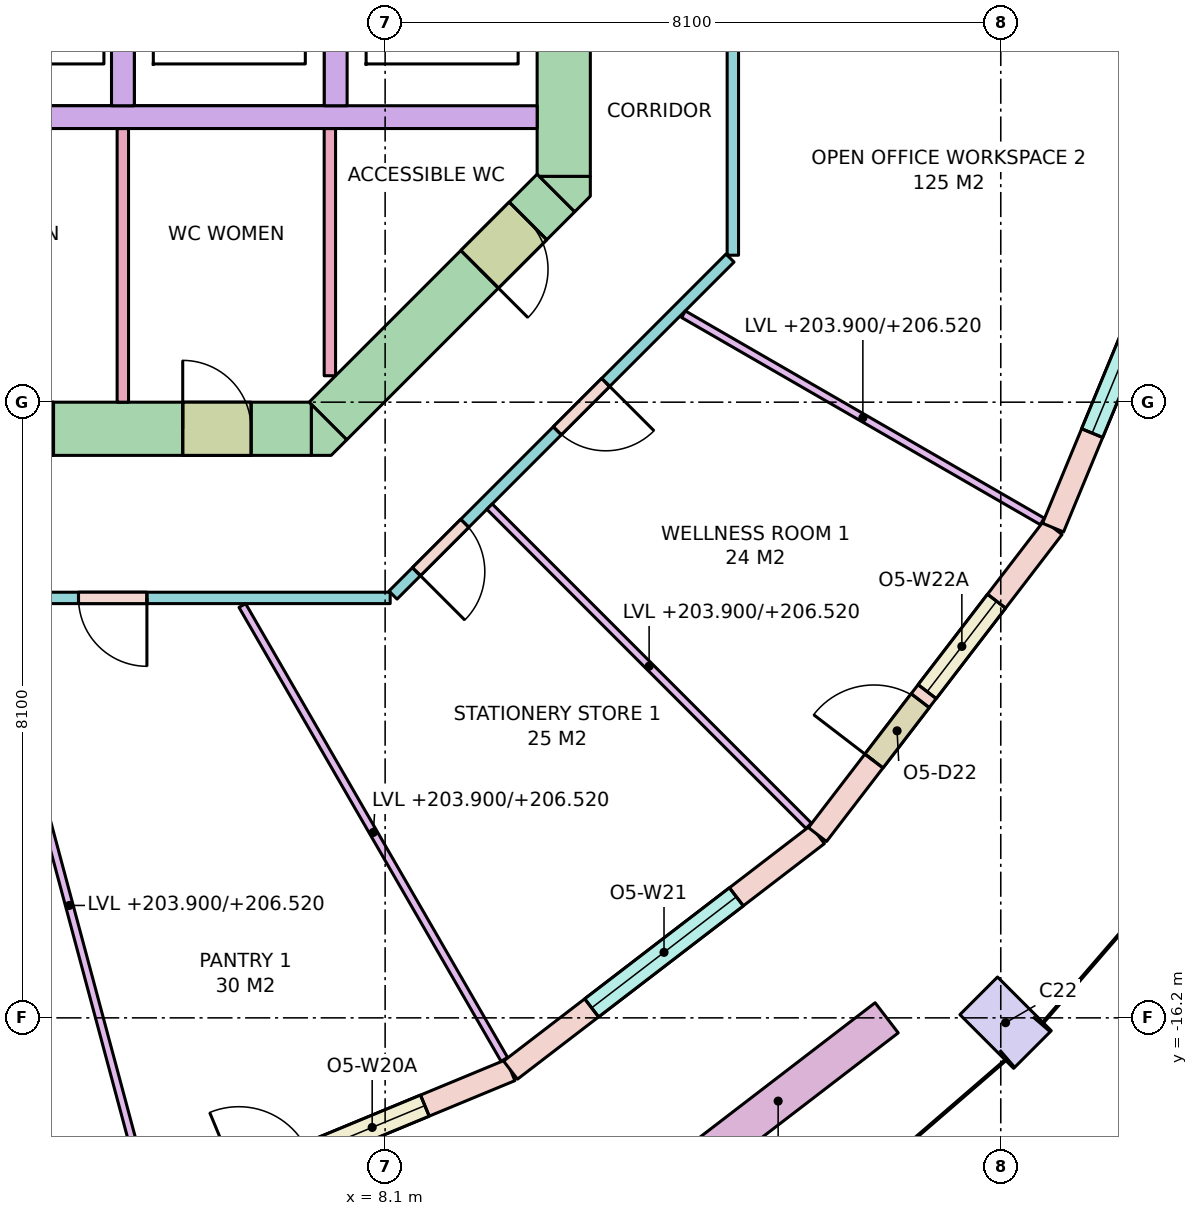
"""IFC4 building model, lengths in metres.
Left out: names, types, materials, properties, quantities, classifications, styles, units other than length and angle.
Written with IfcOpenShell. Run it as: python <this file> out.ifc"""

import sys

from ifc_helpers import new_model, si_unit, direction, frame, frame_2d, origin, origin_2d, place, context, subcontext, project, spatial, polyline, rectangle, outline, extrude, element, fill, save


model = new_model("IFC4")
c1 = context("Model", 3, precision=1e-05, world=origin(), true_north=direction((0.0, 1.0)))
c2 = subcontext(c1, "Body", "Model", "MODEL_VIEW")
j1 = project(units=[si_unit("LENGTHUNIT", "METRE"), si_unit("PLANEANGLEUNIT", "RADIAN")], contexts=[c1])
p1 = place(None, origin())
s1 = spatial("IfcSite", under=j1, at=p1, CompositionType="ELEMENT")
p2 = place(p1, origin())
s2 = spatial("IfcBuilding", under=s1, at=p2, CompositionType="ELEMENT")
p3 = place(p2, frame((0.0, 0.0, 203.9)))
s3 = spatial("IfcBuildingStorey", under=s2, at=p3, CompositionType="ELEMENT", Elevation=203.9)
p4 = place(p3, frame((16.263, -16.263, 0.0), z_axis=(0.0, 0.0, 1.0), x_axis=(0.707106781187, 0.707106781187, 0.0)))
e1 = element("IfcColumn", 1, at=p4, inside=s3, PredefinedType="COLUMN", context=c2, shape_type="SweptSolid", body=[
    extrude(rectangle(XDim=0.7, YDim=1.0, at=origin_2d()), origin(), (0.0, 0.0, 1.0), 3.7),
])
p5 = place(p3, frame((-7.13, -8.45, -0.28), z_axis=(0.0, 0.0, 1.0), x_axis=(1.0, 0.0, 0.0)))
e2 = element("IfcWall", 2, at=p5, inside=s3, PredefinedType="SHEAR", context=c2, shape_type="SweptSolid", body=[
    extrude(rectangle(XDim=14.26, YDim=0.7, at=frame_2d((7.13, 0.0))), origin(), (0.0, 0.0, 1.0), 3.7),
])
p6 = place(p5, frame((8.08, 0.0, 0.28)))
e3 = element("IfcOpeningElement", 3, at=p6, cuts=e2, PredefinedType="OPENING", context=c2, shape_type="SweptSolid", body=[
    extrude(rectangle(XDim=0.7, YDim=2.1, at=frame_2d((0.35, 1.05))), frame((0.0, 0.36, 0.0), z_axis=(0.0, -1.0, 0.0), x_axis=(1.0, 0.0, 0.0)), (0.0, 0.0, 1.0), 0.72),
])
p7 = place(p5, frame((5.58, 0.0, 0.28)))
e4 = element("IfcOpeningElement", 4, at=p7, cuts=e2, PredefinedType="OPENING", context=c2, shape_type="SweptSolid", body=[
    extrude(rectangle(XDim=0.85, YDim=2.1, at=frame_2d((0.425, 1.05))), frame((0.0, 0.36, 0.0), z_axis=(0.0, -1.0, 0.0), x_axis=(1.0, 0.0, 0.0)), (0.0, 0.0, 1.0), 0.72),
])
p8 = place(p5, frame((6.88, 0.0, 0.28)))
e5 = element("IfcOpeningElement", 5, at=p8, cuts=e2, PredefinedType="OPENING", context=c2, shape_type="SweptSolid", body=[
    extrude(rectangle(XDim=0.85, YDim=2.1, at=frame_2d((0.425, 1.05))), frame((0.0, 0.36, 0.0), z_axis=(0.0, -1.0, 0.0), x_axis=(1.0, 0.0, 0.0)), (0.0, 0.0, 1.0), 0.72),
])
p9 = place(p5, frame((9.967, 0.0, 0.28)))
e6 = element("IfcOpeningElement", 6, at=p9, cuts=e2, PredefinedType="OPENING", context=c2, shape_type="SweptSolid", body=[
    extrude(rectangle(XDim=0.9, YDim=2.1, at=frame_2d((0.45, 1.05))), frame((0.0, 0.36, 0.0), z_axis=(0.0, -1.0, 0.0), x_axis=(1.0, 0.0, 0.0)), (0.0, 0.0, 1.0), 0.72),
])
p10 = place(p5, frame((12.567, 0.0, 0.28)))
e7 = element("IfcOpeningElement", 7, at=p10, cuts=e2, PredefinedType="OPENING", context=c2, shape_type="SweptSolid", body=[
    extrude(rectangle(XDim=0.9, YDim=2.1, at=frame_2d((0.45, 1.05))), frame((0.0, 0.36, 0.0), z_axis=(0.0, -1.0, 0.0), x_axis=(1.0, 0.0, 0.0)), (0.0, 0.0, 1.0), 0.72),
])
p11 = place(p3, frame((10.45, -5.13, -0.28), z_axis=(0.0, 0.0, 1.0), x_axis=(0.0, 1.0, 0.0)))
e8 = element("IfcWall", 8, at=p11, inside=s3, PredefinedType="SHEAR", context=c2, shape_type="SweptSolid", body=[
    extrude(rectangle(XDim=10.26, YDim=0.7, at=frame_2d((5.13, 0.0))), origin(), (0.0, 0.0, 1.0), 3.7),
])
p12 = place(p11, frame((4.13, 0.0, 0.28)))
e9 = element("IfcOpeningElement", 9, at=p12, cuts=e8, PredefinedType="OPENING", context=c2, shape_type="SweptSolid", body=[
    extrude(rectangle(XDim=2.0, YDim=2.1, at=frame_2d((1.0, 1.05))), frame((0.0, 0.36, 0.0), z_axis=(0.0, -1.0, 0.0), x_axis=(1.0, 0.0, 0.0)), (0.0, 0.0, 1.0), 0.72),
])
p13 = place(p3, frame((10.347, -5.347, -0.28), z_axis=(0.0, 0.0, 1.0), x_axis=(-0.707106781187, -0.707106781187, 0.0)))
e10 = element("IfcWall", 10, at=p13, inside=s3, PredefinedType="SHEAR", context=c2, shape_type="SweptSolid", body=[
    extrude(rectangle(XDim=4.243, YDim=0.7, at=frame_2d((2.121, 0.0))), origin(), (0.0, 0.0, 1.0), 3.7),
])
p14 = place(p13, frame((0.52, 0.0, 0.28)))
e11 = element("IfcOpeningElement", 11, at=p14, cuts=e10, PredefinedType="OPENING", context=c2, shape_type="SweptSolid", body=[
    extrude(rectangle(XDim=0.9, YDim=2.1, at=frame_2d((0.45, 1.05))), frame((0.0, 0.36, 0.0), z_axis=(0.0, -1.0, 0.0), x_axis=(1.0, 0.0, 0.0)), (0.0, 0.0, 1.0), 0.72),
])
p15 = place(p3, frame((0.0, 0.0, -0.28)))
e12 = element("IfcWall", 12, at=p15, inside=s3, PredefinedType="SHEAR", context=c2, shape_type="SweptSolid", body=[
    extrude(outline(polyline([(7.39, -8.8), (7.13, -8.8), (7.13, -8.8), (7.13, -8.13), (7.595, -8.595), (7.595, -8.595), (7.595, -8.595), (7.39, -8.8)])), origin(), (0.0, 0.0, 1.0), 3.7),
])
p16 = place(p3, frame((0.0, 0.0, -0.28)))
e13 = element("IfcWall", 13, at=p16, inside=s3, PredefinedType="SHEAR", context=c2, shape_type="SweptSolid", body=[
    extrude(outline(polyline([(10.8, -5.39), (10.595, -5.595), (10.595, -5.595), (10.595, -5.595), (10.13, -5.13), (10.8, -5.13), (10.8, -5.13), (10.8, -5.39)])), origin(), (0.0, 0.0, 1.0), 3.7),
])
p17 = place(p3, frame((2.0, -4.35, 0.0), z_axis=(0.0, 0.0, 1.0), x_axis=(1.0, 0.0, 0.0)))
e14 = element("IfcWall", 14, at=p17, inside=s3, PredefinedType="SOLIDWALL", context=c2, shape_type="SweptSolid", body=[
    extrude(rectangle(XDim=8.1, YDim=0.3, at=frame_2d((4.05, 0.0))), origin(), (0.0, 0.0, 1.0), 3.42),
])
for number, where, z_axis, x_axis in (
    (15, (4.65, -4.2, 0.0), (0.0, 0.0, 1.0), (0.0, 1.0, 0.0)),
    (16, (7.45, -4.2, 0.0), (0.0, 0.0, 1.0), (0.0, 1.0, 0.0)),
):
    element("IfcWall", number, at=place(p3, frame(where, z_axis=z_axis, x_axis=x_axis)), inside=s3, PredefinedType="SOLIDWALL", context=c2, shape_type="SweptSolid", body=[
        extrude(rectangle(XDim=2.4, YDim=0.3, at=frame_2d((1.2, 0.0))), origin(), (0.0, 0.0, 1.0), 3.42),
    ])
p18 = place(p3, frame((5.047, -18.836, 0.0), z_axis=(0.0, 0.0, 1.0), x_axis=(0.923862504675, 0.382724538613, 0.0)))
e17 = element("IfcWall", 17, at=p18, inside=s3, PredefinedType="STANDARD", context=c2, shape_type="SweptSolid", body=[
    extrude(rectangle(XDim=5.091, YDim=0.3, at=frame_2d((2.545, 0.0))), origin(), (0.0, 0.0, 1.0), 3.42),
])
p19 = place(p18, frame((1.22, 0.0, 0.0)))
e18 = element("IfcOpeningElement", 18, at=p19, cuts=e17, PredefinedType="OPENING", context=c2, shape_type="SweptSolid", body=[
    extrude(rectangle(XDim=1.0, YDim=2.4, at=frame_2d((0.5, 1.2))), frame((0.0, 0.16, 0.0), z_axis=(0.0, -1.0, 0.0), x_axis=(1.0, 0.0, 0.0)), (0.0, 0.0, 1.0), 0.32),
])
p20 = place(p18, frame((2.37, 0.0, 0.8)))
e19 = element("IfcOpeningElement", 19, at=p20, cuts=e17, PredefinedType="OPENING", context=c2, shape_type="SweptSolid", body=[
    extrude(rectangle(XDim=1.5, YDim=2.4, at=frame_2d((0.75, 1.2))), frame((0.0, 0.16, 0.0), z_axis=(0.0, -1.0, 0.0), x_axis=(1.0, 0.0, 0.0)), (0.0, 0.0, 1.0), 0.32),
])
p21 = place(p3, frame((9.75, -16.887, 0.0), z_axis=(0.0, 0.0, 1.0), x_axis=(0.79335619014, 0.608757714995, 0.0)))
e20 = element("IfcWall", 20, at=p21, inside=s3, PredefinedType="STANDARD", context=c2, shape_type="SweptSolid", body=[
    extrude(rectangle(XDim=5.091, YDim=0.3, at=frame_2d((2.545, 0.0))), origin(), (0.0, 0.0, 1.0), 3.42),
])
p22 = place(p21, frame((1.345, 0.0, 0.8)))
e21 = element("IfcOpeningElement", 21, at=p22, cuts=e20, PredefinedType="OPENING", context=c2, shape_type="SweptSolid", body=[
    extrude(rectangle(XDim=2.4, YDim=2.4, at=frame_2d((1.2, 1.2))), frame((0.0, 0.16, 0.0), z_axis=(0.0, -1.0, 0.0), x_axis=(1.0, 0.0, 0.0)), (0.0, 0.0, 1.0), 0.32),
])
p23 = place(p3, frame((13.789, -13.789, 0.0), z_axis=(0.0, 0.0, 1.0), x_axis=(0.608757714995, 0.79335619014, 0.0)))
e22 = element("IfcWall", 22, at=p23, inside=s3, PredefinedType="STANDARD", context=c2, shape_type="SweptSolid", body=[
    extrude(rectangle(XDim=5.091, YDim=0.3, at=frame_2d((2.545, 0.0))), origin(), (0.0, 0.0, 1.0), 3.42),
])
p24 = place(p23, frame((1.22, 0.0, 0.0)))
e23 = element("IfcOpeningElement", 23, at=p24, cuts=e22, PredefinedType="OPENING", context=c2, shape_type="SweptSolid", body=[
    extrude(rectangle(XDim=1.0, YDim=2.4, at=frame_2d((0.5, 1.2))), frame((0.0, 0.16, 0.0), z_axis=(0.0, -1.0, 0.0), x_axis=(1.0, 0.0, 0.0)), (0.0, 0.0, 1.0), 0.32),
])
p25 = place(p23, frame((2.37, 0.0, 0.8)))
e24 = element("IfcOpeningElement", 24, at=p25, cuts=e22, PredefinedType="OPENING", context=c2, shape_type="SweptSolid", body=[
    extrude(rectangle(XDim=1.5, YDim=2.4, at=frame_2d((0.75, 1.2))), frame((0.0, 0.16, 0.0), z_axis=(0.0, -1.0, 0.0), x_axis=(1.0, 0.0, 0.0)), (0.0, 0.0, 1.0), 0.32),
])
p26 = place(p3, frame((16.887, -9.75, 0.0), z_axis=(0.0, 0.0, 1.0), x_axis=(0.382724538613, 0.923862504675, 0.0)))
e25 = element("IfcWall", 25, at=p26, inside=s3, PredefinedType="STANDARD", context=c2, shape_type="SweptSolid", body=[
    extrude(rectangle(XDim=5.091, YDim=0.3, at=frame_2d((2.545, 0.0))), origin(), (0.0, 0.0, 1.0), 3.42),
])
p27 = place(p26, frame((1.345, 0.0, 0.8)))
e26 = element("IfcOpeningElement", 26, at=p27, cuts=e25, PredefinedType="OPENING", context=c2, shape_type="SweptSolid", body=[
    extrude(rectangle(XDim=2.4, YDim=2.4, at=frame_2d((1.2, 1.2))), frame((0.0, 0.16, 0.0), z_axis=(0.0, -1.0, 0.0), x_axis=(1.0, 0.0, 0.0)), (0.0, 0.0, 1.0), 0.32),
])
p28 = place(p3, frame((11.843, -18.391, 0.0), z_axis=(0.0, 0.0, 1.0), x_axis=(0.793326845617, 0.608795955984, 0.0)))
e27 = element("IfcWall", 27, at=p28, inside=s3, PredefinedType="PARAPET", context=c2, shape_type="SweptSolid", body=[
    extrude(rectangle(XDim=3.6, YDim=0.5, at=frame_2d((1.8, 0.0))), origin(), (0.0, 0.0, 1.0), 0.9),
])
p29 = place(p3, frame((4.649, -8.1, 0.0), z_axis=(0.0, 0.0, 1.0), x_axis=(0.0, 1.0, 0.0)))
e28 = element("IfcWall", 28, at=p29, inside=s3, PredefinedType="PARTITIONING", context=c2, shape_type="SweptSolid", body=[
    extrude(rectangle(XDim=3.6, YDim=0.15, at=frame_2d((1.8, 0.0))), origin(), (0.0, 0.0, 1.0), 3.42),
])
p30 = place(p3, frame((7.373, -7.752, 0.0), z_axis=(0.0, 0.0, 1.0), x_axis=(0.0, 1.0, 0.0)))
e29 = element("IfcWall", 29, at=p30, inside=s3, PredefinedType="PARTITIONING", context=c2, shape_type="SweptSolid", body=[
    extrude(rectangle(XDim=3.252, YDim=0.15, at=frame_2d((1.626, 0.0))), origin(), (0.0, 0.0, 1.0), 3.42),
])
p31 = place(p3, frame((12.638, -6.204, 0.0), z_axis=(0.0, 0.0, 1.0), x_axis=(-0.707106781187, -0.707106781187, 0.0)))
e30 = element("IfcWall", 30, at=p31, inside=s3, PredefinedType="PARTITIONING", context=c2, shape_type="SweptSolid", body=[
    extrude(rectangle(XDim=6.271, YDim=0.15, at=frame_2d((3.135, 0.0))), origin(), (0.0, 0.0, 1.0), 2.62),
])
p32 = place(p31, frame((4.935, 0.0, 0.0)))
e31 = element("IfcOpeningElement", 31, at=p32, cuts=e30, PredefinedType="OPENING", context=c2, shape_type="SweptSolid", body=[
    extrude(rectangle(XDim=0.9, YDim=2.1, at=frame_2d((0.45, 1.05))), frame((0.0, 0.085, 0.0), z_axis=(0.0, -1.0, 0.0), x_axis=(1.0, 0.0, 0.0)), (0.0, 0.0, 1.0), 0.17),
])
p33 = place(p31, frame((2.314, 0.0, 0.0)))
e32 = element("IfcOpeningElement", 32, at=p33, cuts=e30, PredefinedType="OPENING", context=c2, shape_type="SweptSolid", body=[
    extrude(rectangle(XDim=0.9, YDim=2.1, at=frame_2d((0.45, 1.05))), frame((0.0, 0.085, 0.0), z_axis=(0.0, -1.0, 0.0), x_axis=(1.0, 0.0, 0.0)), (0.0, 0.0, 1.0), 0.17),
])
p34 = place(p3, frame((8.167, -10.675, 0.0), z_axis=(0.0, 0.0, 1.0), x_axis=(-1.0, 0.0, 0.0)))
e33 = element("IfcWall", 33, at=p34, inside=s3, PredefinedType="PARTITIONING", context=c2, shape_type="SweptSolid", body=[
    extrude(rectangle(XDim=16.333, YDim=0.15, at=frame_2d((8.167, 0.0))), origin(), (0.0, 0.0, 1.0), 2.62),
])
p35 = place(p34, frame((12.232, 0.0, 0.0)))
e34 = element("IfcOpeningElement", 34, at=p35, cuts=e33, PredefinedType="OPENING", context=c2, shape_type="SweptSolid", body=[
    extrude(rectangle(XDim=0.9, YDim=2.1, at=frame_2d((0.45, 1.05))), frame((0.0, 0.085, 0.0), z_axis=(0.0, -1.0, 0.0), x_axis=(1.0, 0.0, 0.0)), (0.0, 0.0, 1.0), 0.17),
])
p36 = place(p34, frame((9.148, 0.0, 0.0)))
e35 = element("IfcOpeningElement", 35, at=p36, cuts=e33, PredefinedType="OPENING", context=c2, shape_type="SweptSolid", body=[
    extrude(rectangle(XDim=0.9, YDim=2.1, at=frame_2d((0.45, 1.05))), frame((0.0, 0.085, 0.0), z_axis=(0.0, -1.0, 0.0), x_axis=(1.0, 0.0, 0.0)), (0.0, 0.0, 1.0), 0.17),
])
p37 = place(p34, frame((6.285, 0.0, 0.0)))
e36 = element("IfcOpeningElement", 36, at=p37, cuts=e33, PredefinedType="OPENING", context=c2, shape_type="SweptSolid", body=[
    extrude(rectangle(XDim=0.9, YDim=2.1, at=frame_2d((0.45, 1.05))), frame((0.0, 0.085, 0.0), z_axis=(0.0, -1.0, 0.0), x_axis=(1.0, 0.0, 0.0)), (0.0, 0.0, 1.0), 0.17),
])
p38 = place(p34, frame((3.201, 0.0, 0.0)))
e37 = element("IfcOpeningElement", 37, at=p38, cuts=e33, PredefinedType="OPENING", context=c2, shape_type="SweptSolid", body=[
    extrude(rectangle(XDim=0.9, YDim=2.1, at=frame_2d((0.45, 1.05))), frame((0.0, 0.085, 0.0), z_axis=(0.0, -1.0, 0.0), x_axis=(1.0, 0.0, 0.0)), (0.0, 0.0, 1.0), 0.17),
])
p39 = place(p3, frame((12.675, 6.167, 0.0), z_axis=(0.0, 0.0, 1.0), x_axis=(0.0, -1.0, 0.0)))
e38 = element("IfcWall", 38, at=p39, inside=s3, PredefinedType="PARTITIONING", context=c2, shape_type="SweptSolid", body=[
    extrude(rectangle(XDim=12.333, YDim=0.15, at=frame_2d((6.167, 0.0))), origin(), (0.0, 0.0, 1.0), 2.62),
])
p40 = place(p39, frame((5.267, 0.0, 0.0)))
e39 = element("IfcOpeningElement", 39, at=p40, cuts=e38, PredefinedType="OPENING", context=c2, shape_type="SweptSolid", body=[
    extrude(rectangle(XDim=1.8, YDim=2.1, at=frame_2d((0.9, 1.05))), frame((0.0, 0.085, 0.0), z_axis=(0.0, -1.0, 0.0), x_axis=(1.0, 0.0, 0.0)), (0.0, 0.0, 1.0), 0.17),
])
p41 = place(p3, frame((2.884, -10.764, 0.0), z_axis=(0.0, 0.0, 1.0), x_axis=(0.258818011497, -0.965926103242, 0.0)))
e40 = element("IfcWall", 40, at=p41, inside=s3, PredefinedType="PARTITIONING", context=c2, shape_type="SweptSolid", body=[
    extrude(rectangle(XDim=8.192, YDim=0.1, at=frame_2d((4.096, 0.0))), origin(), (0.0, 0.0, 1.0), 2.62),
])
p42 = place(p3, frame((6.221, -10.775, 0.0), z_axis=(0.0, 0.0, 1.0), x_axis=(0.500015661236, -0.866016361577, 0.0)))
e41 = element("IfcWall", 41, at=p42, inside=s3, PredefinedType="PARTITIONING", context=c2, shape_type="SweptSolid", body=[
    extrude(rectangle(XDim=6.895, YDim=0.1, at=frame_2d((3.448, 0.0))), origin(), (0.0, 0.0, 1.0), 2.62),
])
p43 = place(p3, frame((9.474, -9.474, 0.0), z_axis=(0.0, 0.0, 1.0), x_axis=(0.707106781187, -0.707106781187, 0.0)))
e42 = element("IfcWall", 42, at=p43, inside=s3, PredefinedType="PARTITIONING", context=c2, shape_type="SweptSolid", body=[
    extrude(rectangle(XDim=5.938, YDim=0.1, at=frame_2d((2.969, 0.0))), origin(), (0.0, 0.0, 1.0), 2.62),
])
p44 = place(p3, frame((12.025, -6.943, 0.0), z_axis=(0.0, 0.0, 1.0), x_axis=(0.866029712004, -0.499992537871, 0.0)))
e43 = element("IfcWall", 43, at=p44, inside=s3, PredefinedType="PARTITIONING", context=c2, shape_type="SweptSolid", body=[
    extrude(rectangle(XDim=5.451, YDim=0.1, at=frame_2d((2.726, 0.0))), origin(), (0.0, 0.0, 1.0), 2.62),
])
p45 = place(p20, origin())
e44 = element("IfcWindow", 44, at=p45, inside=s3, PartitioningType="SINGLE_PANEL", PredefinedType="WINDOW", context=c2, shape_type="SweptSolid", body=[
    extrude(rectangle(XDim=1.5, YDim=2.4, at=frame_2d((0.75, 1.2))), frame((0.0, 0.03, 0.0), z_axis=(0.0, -1.0, 0.0), x_axis=(1.0, 0.0, 0.0)), (0.0, 0.0, 1.0), 0.06),
])
fill(e19, e44)
p46 = place(p22, origin())
e45 = element("IfcWindow", 45, at=p46, inside=s3, PartitioningType="SINGLE_PANEL", PredefinedType="WINDOW", context=c2, shape_type="SweptSolid", body=[
    extrude(rectangle(XDim=2.4, YDim=2.4, at=frame_2d((1.2, 1.2))), frame((0.0, 0.03, 0.0), z_axis=(0.0, -1.0, 0.0), x_axis=(1.0, 0.0, 0.0)), (0.0, 0.0, 1.0), 0.06),
])
fill(e21, e45)
p47 = place(p24, origin())
e46 = element("IfcDoor", 46, at=p47, inside=s3, OperationType="SINGLE_SWING_LEFT", PredefinedType="DOOR", context=c2, shape_type="SweptSolid", body=[
    extrude(rectangle(XDim=1.0, YDim=2.4, at=frame_2d((0.5, 1.2))), frame((0.0, 0.025, 0.0), z_axis=(0.0, -1.0, 0.0), x_axis=(1.0, 0.0, 0.0)), (0.0, 0.0, 1.0), 0.05),
])
fill(e23, e46)
p48 = place(p25, origin())
e47 = element("IfcWindow", 47, at=p48, inside=s3, PartitioningType="SINGLE_PANEL", PredefinedType="WINDOW", context=c2, shape_type="SweptSolid", body=[
    extrude(rectangle(XDim=1.5, YDim=2.4, at=frame_2d((0.75, 1.2))), frame((0.0, 0.03, 0.0), z_axis=(0.0, -1.0, 0.0), x_axis=(1.0, 0.0, 0.0)), (0.0, 0.0, 1.0), 0.06),
])
fill(e24, e47)
p49 = place(p27, origin())
e48 = element("IfcWindow", 48, at=p49, inside=s3, PartitioningType="SINGLE_PANEL", PredefinedType="WINDOW", context=c2, shape_type="SweptSolid", body=[
    extrude(rectangle(XDim=2.4, YDim=2.4, at=frame_2d((1.2, 1.2))), frame((0.0, 0.03, 0.0), z_axis=(0.0, -1.0, 0.0), x_axis=(1.0, 0.0, 0.0)), (0.0, 0.0, 1.0), 0.06),
])
fill(e26, e48)
p50 = place(p9, origin())
e49 = element("IfcDoor", 49, at=p50, inside=s3, OperationType="SINGLE_SWING_LEFT", PredefinedType="DOOR", context=c2, shape_type="SweptSolid", body=[
    extrude(rectangle(XDim=0.9, YDim=2.1, at=frame_2d((0.45, 1.05))), frame((0.0, 0.025, 0.0), z_axis=(0.0, -1.0, 0.0), x_axis=(1.0, 0.0, 0.0)), (0.0, 0.0, 1.0), 0.05),
])
fill(e6, e49)
p51 = place(p10, origin())
e50 = element("IfcDoor", 50, at=p51, inside=s3, OperationType="SINGLE_SWING_LEFT", PredefinedType="DOOR", context=c2, shape_type="SweptSolid", body=[
    extrude(rectangle(XDim=0.9, YDim=2.1, at=frame_2d((0.45, 1.05))), frame((0.0, 0.025, 0.0), z_axis=(0.0, -1.0, 0.0), x_axis=(1.0, 0.0, 0.0)), (0.0, 0.0, 1.0), 0.05),
])
fill(e7, e50)
p52 = place(p14, origin())
e51 = element("IfcDoor", 51, at=p52, inside=s3, OperationType="SINGLE_SWING_RIGHT", PredefinedType="DOOR", context=c2, shape_type="SweptSolid", body=[
    extrude(rectangle(XDim=0.9, YDim=2.1, at=frame_2d((0.45, 1.05))), frame((0.0, 0.025, 0.0), z_axis=(0.0, -1.0, 0.0), x_axis=(1.0, 0.0, 0.0)), (0.0, 0.0, 1.0), 0.05),
])
fill(e11, e51)
p53 = place(p38, origin())
e52 = element("IfcDoor", 52, at=p53, inside=s3, OperationType="SINGLE_SWING_LEFT", PredefinedType="DOOR", context=c2, shape_type="SweptSolid", body=[
    extrude(rectangle(XDim=0.9, YDim=2.1, at=frame_2d((0.45, 1.05))), frame((0.0, 0.025, 0.0), z_axis=(0.0, -1.0, 0.0), x_axis=(1.0, 0.0, 0.0)), (0.0, 0.0, 1.0), 0.05),
])
fill(e37, e52)
p54 = place(p32, origin())
e53 = element("IfcDoor", 53, at=p54, inside=s3, OperationType="SINGLE_SWING_RIGHT", PredefinedType="DOOR", context=c2, shape_type="SweptSolid", body=[
    extrude(rectangle(XDim=0.9, YDim=2.1, at=frame_2d((0.45, 1.05))), frame((0.0, 0.025, 0.0), z_axis=(0.0, -1.0, 0.0), x_axis=(1.0, 0.0, 0.0)), (0.0, 0.0, 1.0), 0.05),
])
fill(e31, e53)
p55 = place(p33, origin())
e54 = element("IfcDoor", 54, at=p55, inside=s3, OperationType="SINGLE_SWING_LEFT", PredefinedType="DOOR", context=c2, shape_type="SweptSolid", body=[
    extrude(rectangle(XDim=0.9, YDim=2.1, at=frame_2d((0.45, 1.05))), frame((0.0, 0.025, 0.0), z_axis=(0.0, -1.0, 0.0), x_axis=(1.0, 0.0, 0.0)), (0.0, 0.0, 1.0), 0.05),
])
fill(e32, e54)
save(model, sys.argv[1])
